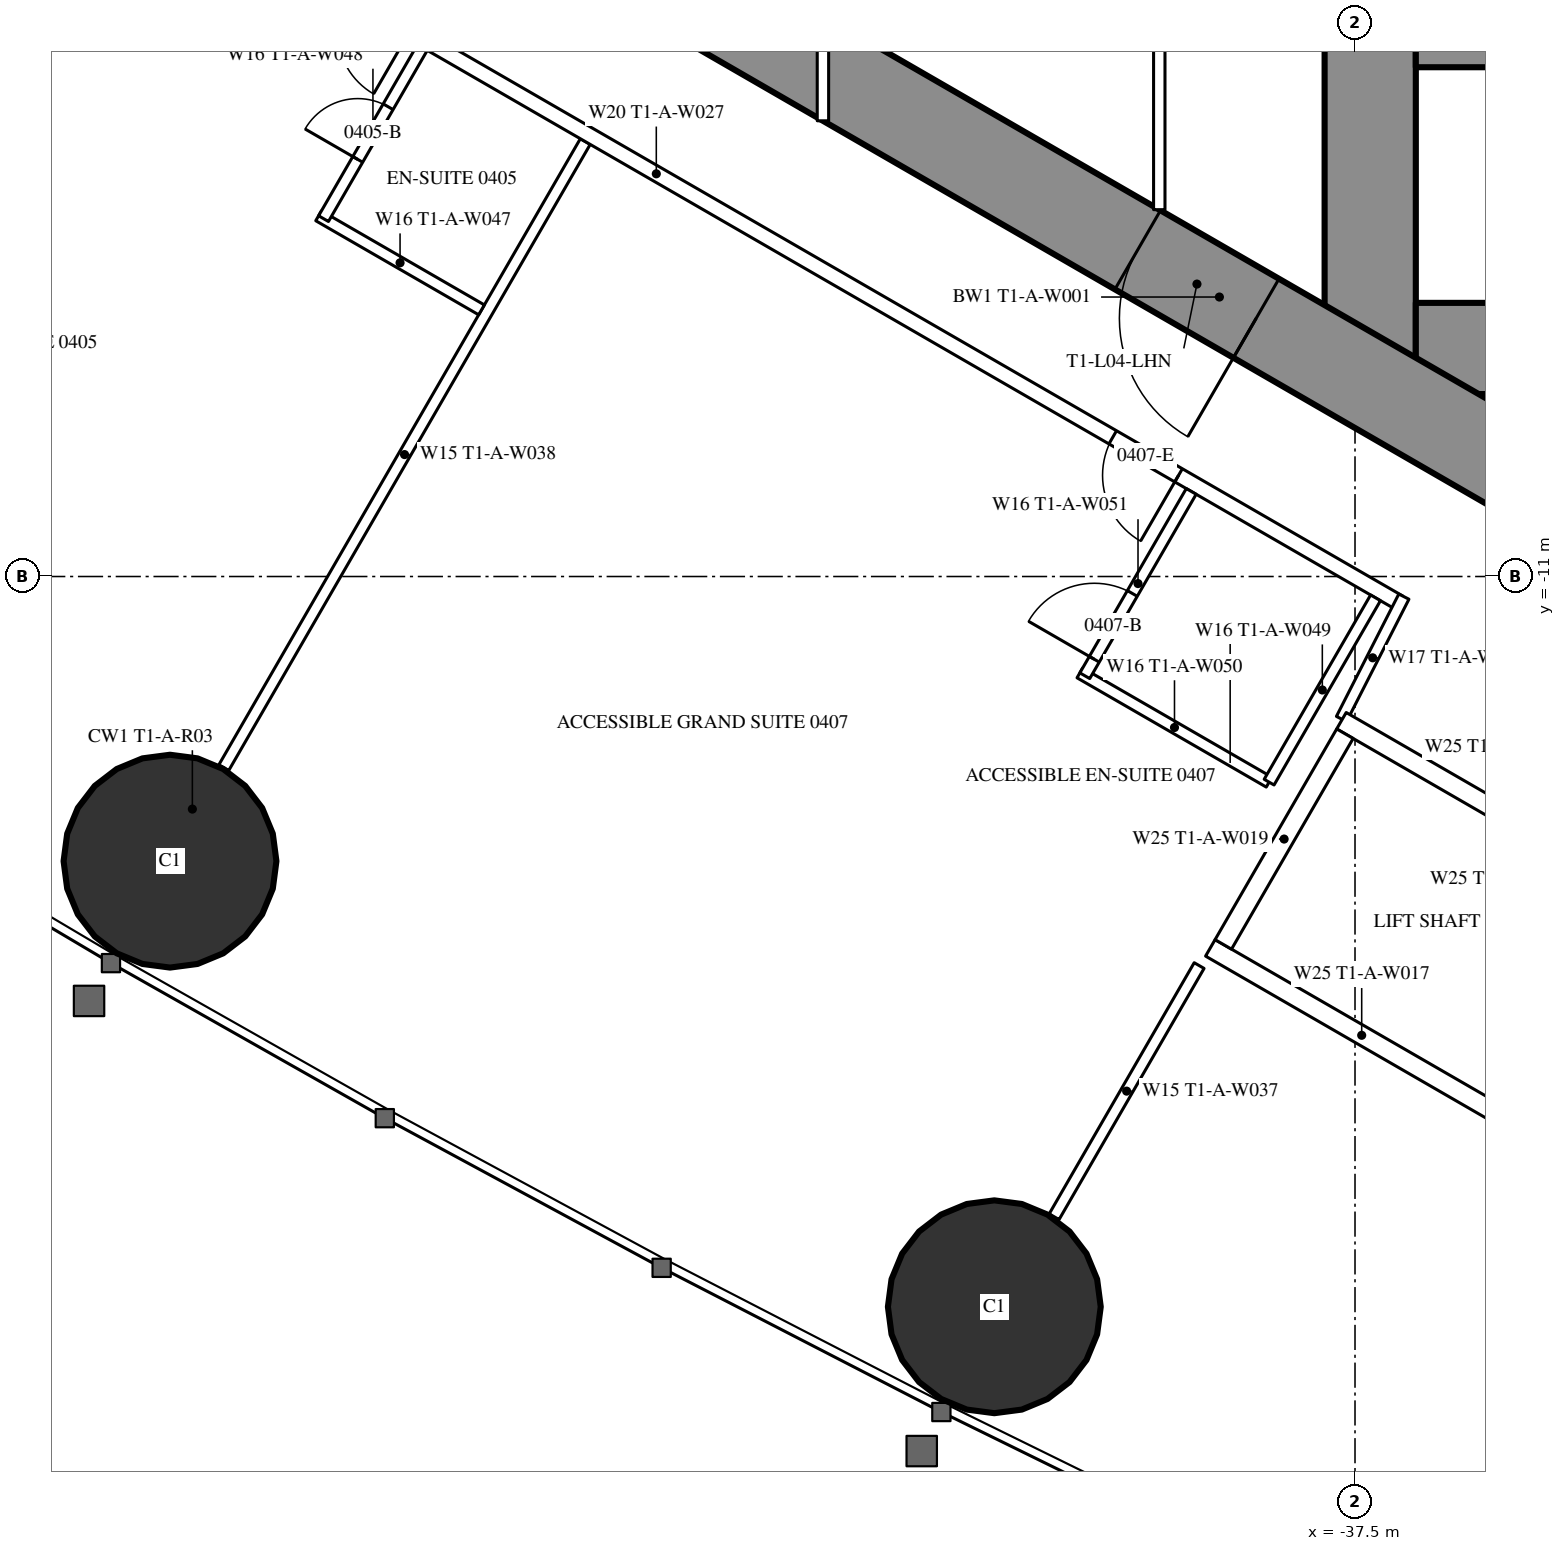
"""IFC4 building model, lengths in metres.
Left out: names, types, materials, properties, quantities, classifications, styles, units other than length and angle.
Written with IfcOpenShell. Run it as: python <this file> out.ifc"""

import sys

from ifc_helpers import new_model, si_unit, direction, frame, frame_2d, origin, origin_2d, place, context, subcontext, project, spatial, rectangle, hollow_circle, extrude, element, fill, save


model = new_model("IFC4")
c1 = context("Model", 3, precision=1e-05, world=origin(), true_north=direction((0.0, 1.0)))
c2 = subcontext(c1, "Body", "Model", "MODEL_VIEW")
j1 = project(units=[si_unit("LENGTHUNIT", "METRE"), si_unit("PLANEANGLEUNIT", "RADIAN")], contexts=[c1])
p1 = place(None, origin())
s1 = spatial("IfcSite", under=j1, at=p1, CompositionType="ELEMENT")
p2 = place(p1, origin())
s2 = spatial("IfcBuilding", under=s1, at=p2, CompositionType="ELEMENT")
p3 = place(p2, frame((0.0, 0.0, 21.5)))
s3 = spatial("IfcBuildingStorey", under=s2, at=p3, CompositionType="ELEMENT", Elevation=21.5)
for number, where, z_axis, x_axis in (
    (1, (-53.09, -14.745, 0.0), (0.0, 0.0, 1.0), (1.0, 0.0, 0.0)),
    (2, (-42.245, -20.607, 0.0), (0.0, 0.0, 1.0), (1.0, 0.0, 0.0)),
):
    element("IfcColumn", number, at=place(p3, frame(where, z_axis=z_axis, x_axis=x_axis)), inside=s3, PredefinedType="COLUMN", context=c2, shape_type="SweptSolid", body=[
        extrude(hollow_circle(Radius=1.4, WallThickness=0.12, at=origin_2d()), origin(), (0.0, 0.0, 1.0), 3.5),
    ])
p4 = place(p3, frame((-37.3, 8.6, 0.0), z_axis=(0.0, 0.0, 1.0), x_axis=(0.0, -1.0, 0.0)))
e3 = element("IfcWall", 3, at=p4, inside=s3, PredefinedType="SHEAR", context=c2, shape_type="SweptSolid", body=[
    extrude(rectangle(XDim=17.2, YDim=1.2, at=frame_2d((8.6, 0.0))), origin(), (0.0, 0.0, 1.0), 3.5),
])
p5 = place(p4, frame((7.7, 0.0, 0.0)))
e4 = element("IfcOpeningElement", 4, at=p5, cuts=e3, PredefinedType="OPENING", context=c2, shape_type="SweptSolid", body=[
    extrude(rectangle(XDim=1.8, YDim=2.2, at=frame_2d((0.9, 1.1))), frame((0.0, 0.61, 0.0), z_axis=(0.0, -1.0, 0.0), x_axis=(1.0, 0.0, 0.0)), (0.0, 0.0, 1.0), 1.22),
])
p6 = place(p3, frame((-28.3, -8.0, 0.0), z_axis=(0.0, 0.0, 1.0), x_axis=(-1.0, 0.0, 0.0)))
e5 = element("IfcWall", 5, at=p6, inside=s3, PredefinedType="SHEAR", context=c2, shape_type="SweptSolid", body=[
    extrude(rectangle(XDim=8.4, YDim=1.2, at=frame_2d((4.2, 0.0))), origin(), (0.0, 0.0, 1.0), 3.5),
])
p7 = place(p6, frame((0.25, 0.0, 0.0)))
e6 = element("IfcOpeningElement", 6, at=p7, cuts=e5, PredefinedType="OPENING", context=c2, shape_type="SweptSolid", body=[
    extrude(rectangle(XDim=1.0, YDim=2.2, at=frame_2d((0.5, 1.1))), frame((0.0, 0.61, 0.0), z_axis=(0.0, -1.0, 0.0), x_axis=(1.0, 0.0, 0.0)), (0.0, 0.0, 1.0), 1.22),
])
p8 = place(p3, frame((-28.3, -4.15, 0.0), z_axis=(0.0, 0.0, 1.0), x_axis=(-1.0, 0.0, 0.0)))
e7 = element("IfcWall", 7, at=p8, inside=s3, PredefinedType="SHEAR", context=c2, shape_type="SweptSolid", body=[
    extrude(rectangle(XDim=8.4, YDim=0.3, at=frame_2d((4.2, 0.0))), origin(), (0.0, 0.0, 1.0), 3.5),
])
p9 = place(p3, frame((-27.2, -14.3, 0.0), z_axis=(0.0, 0.0, 1.0), x_axis=(-0.866024021859, 0.500002393557, 0.0)))
e8 = element("IfcWall", 8, at=p9, inside=s3, PredefinedType="SHEAR", context=c2, shape_type="SweptSolid", body=[
    extrude(rectangle(XDim=27.907, YDim=1.2, at=frame_2d((13.954, 0.0))), origin(), (0.0, 0.0, 1.0), 3.5),
])
p10 = place(p9, frame((4.6, 0.0, 0.0)))
e9 = element("IfcOpeningElement", 9, at=p10, cuts=e8, PredefinedType="OPENING", context=c2, shape_type="SweptSolid", body=[
    extrude(rectangle(XDim=1.0, YDim=2.2, at=frame_2d((0.5, 1.1))), frame((0.0, 0.61, 0.0), z_axis=(0.0, -1.0, 0.0), x_axis=(1.0, 0.0, 0.0)), (0.0, 0.0, 1.0), 1.22),
])
p11 = place(p9, frame((13.395, 0.0, 0.0)))
e10 = element("IfcOpeningElement", 10, at=p11, cuts=e8, PredefinedType="OPENING", context=c2, shape_type="SweptSolid", body=[
    extrude(rectangle(XDim=1.8, YDim=2.2, at=frame_2d((0.9, 1.1))), frame((0.0, 0.61, 0.0), z_axis=(0.0, -1.0, 0.0), x_axis=(1.0, 0.0, 0.0)), (0.0, 0.0, 1.0), 1.22),
])
p12 = place(p3, frame((-47.627, -5.278, 0.0), z_axis=(0.0, 0.0, 1.0), x_axis=(-0.500009844318, -0.86601972009, 0.0)))
e11 = element("IfcWall", 11, at=p12, inside=s3, PredefinedType="PARTITIONING", context=c2, shape_type="SweptSolid", body=[
    extrude(rectangle(XDim=9.51, YDim=0.15, at=frame_2d((4.755, 0.0))), origin(), (0.0, 0.0, 1.0), 2.25),
])
p13 = place(p3, frame((-39.551, -16.118, 0.0), z_axis=(0.0, 0.0, 1.0), x_axis=(-0.499986503906, -0.866033195618, 0.0)))
e12 = element("IfcWall", 12, at=p13, inside=s3, PredefinedType="PARTITIONING", context=c2, shape_type="SweptSolid", body=[
    extrude(rectangle(XDim=3.815, YDim=0.15, at=frame_2d((1.907, 0.0))), origin(), (0.0, 0.0, 1.0), 3.25),
])
p14 = place(p3, frame((-36.92, -11.344, 0.0), z_axis=(0.0, 0.0, 1.0), x_axis=(-0.866028313256, 0.499994960614, 0.0)))
e13 = element("IfcWall", 13, at=p14, inside=s3, PredefinedType="PARTITIONING", context=c2, shape_type="SweptSolid", body=[
    extrude(rectangle(XDim=22.568, YDim=0.2, at=frame_2d((11.284, 0.0))), origin(), (0.0, 0.0, 1.0), 3.25),
])
p15 = place(p14, frame((15.03, 0.0, 0.0)))
e14 = element("IfcOpeningElement", 14, at=p15, cuts=e13, PredefinedType="OPENING", context=c2, shape_type="SweptSolid", body=[
    extrude(rectangle(XDim=0.95, YDim=2.2, at=frame_2d((0.475, 1.1))), frame((0.0, 0.11, 0.0), z_axis=(0.0, -1.0, 0.0), x_axis=(1.0, 0.0, 0.0)), (0.0, 0.0, 1.0), 0.22),
])
p16 = place(p14, frame((3.35, 0.0, 0.0)))
e15 = element("IfcOpeningElement", 15, at=p16, cuts=e13, PredefinedType="OPENING", context=c2, shape_type="SweptSolid", body=[
    extrude(rectangle(XDim=1.0, YDim=2.2, at=frame_2d((0.5, 1.1))), frame((0.0, 0.11, 0.0), z_axis=(0.0, -1.0, 0.0), x_axis=(1.0, 0.0, 0.0)), (0.0, 0.0, 1.0), 0.22),
])
p17 = place(p3, frame((-36.857, -11.265, 0.0), z_axis=(0.0, 0.0, 1.0), x_axis=(-0.454225294761, -0.890886851176, 0.0)))
e16 = element("IfcWall", 16, at=p17, inside=s3, PredefinedType="PARTITIONING", context=c2, shape_type="SweptSolid", body=[
    extrude(rectangle(XDim=1.807, YDim=0.15, at=frame_2d((0.904, 0.0))), origin(), (0.0, 0.0, 1.0), 3.25),
])
p18 = place(p3, frame((-48.992, -7.492, 0.0), z_axis=(0.0, 0.0, 1.0), x_axis=(-0.866031185235, 0.4999899861, 0.0)))
e17 = element("IfcWall", 17, at=p18, inside=s3, PredefinedType="PARTITIONING", context=c2, shape_type="SweptSolid", body=[
    extrude(rectangle(XDim=2.475, YDim=0.15, at=frame_2d((1.238, 0.0))), origin(), (0.0, 0.0, 1.0), 3.25),
])
p19 = place(p3, frame((-49.77, -4.04, 0.0), z_axis=(0.0, 0.0, 1.0), x_axis=(-0.500006934395, -0.866021400173, 0.0)))
e18 = element("IfcWall", 18, at=p19, inside=s3, PredefinedType="PARTITIONING", context=c2, shape_type="SweptSolid", body=[
    extrude(rectangle(XDim=2.6, YDim=0.15, at=frame_2d((1.3, 0.0))), origin(), (0.0, 0.0, 1.0), 3.25),
])
p20 = place(p19, frame((0.9, 0.0, 0.0)))
e19 = element("IfcOpeningElement", 19, at=p20, cuts=e18, PredefinedType="OPENING", context=c2, shape_type="SweptSolid", body=[
    extrude(rectangle(XDim=0.8, YDim=2.2, at=frame_2d((0.4, 1.1))), frame((0.0, 0.085, 0.0), z_axis=(0.0, -1.0, 0.0), x_axis=(1.0, 0.0, 0.0)), (0.0, 0.0, 1.0), 0.17),
])
p21 = place(p3, frame((-38.63, -13.705, 0.0), z_axis=(0.0, 0.0, 1.0), x_axis=(-0.866018712932, 0.500011588718, 0.0)))
e20 = element("IfcWall", 20, at=p21, inside=s3, PredefinedType="PARTITIONING", context=c2, shape_type="SweptSolid", body=[
    extrude(rectangle(XDim=2.875, YDim=0.15, at=frame_2d((1.438, 0.0))), origin(), (0.0, 0.0, 1.0), 3.25),
])
p22 = place(p3, frame((-39.655, -9.88, 0.0), z_axis=(0.0, 0.0, 1.0), x_axis=(-0.500049511043, -0.865996816683, 0.0)))
e21 = element("IfcWall", 21, at=p22, inside=s3, PredefinedType="PARTITIONING", context=c2, shape_type="SweptSolid", body=[
    extrude(rectangle(XDim=2.8, YDim=0.15, at=frame_2d((1.4, 0.0))), origin(), (0.0, 0.0, 1.0), 3.25),
])
p23 = place(p22, frame((1.55, 0.0, 0.0)))
e22 = element("IfcOpeningElement", 22, at=p23, cuts=e21, PredefinedType="OPENING", context=c2, shape_type="SweptSolid", body=[
    extrude(rectangle(XDim=1.0, YDim=2.2, at=frame_2d((0.5, 1.1))), frame((0.0, 0.085, 0.0), z_axis=(0.0, -1.0, 0.0), x_axis=(1.0, 0.0, 0.0)), (0.0, 0.0, 1.0), 0.17),
])
p24 = place(p3, frame((-37.23, -11.281, 0.0), z_axis=(0.0, 0.0, 1.0), x_axis=(-0.500049511043, -0.865996816683, 0.0)))
e23 = element("IfcWall", 23, at=p24, inside=s3, PredefinedType="PARTITIONING", context=c2, shape_type="SweptSolid", body=[
    extrude(rectangle(XDim=2.8, YDim=0.15, at=frame_2d((1.4, 0.0))), origin(), (0.0, 0.0, 1.0), 3.25),
])
p25 = place(p3, frame((-40.075, 1.2, 0.0), z_axis=(0.0, 0.0, 1.0), x_axis=(0.0, -1.0, 0.0)))
e24 = element("IfcWall", 24, at=p25, inside=s3, PredefinedType="PARTITIONING", context=c2, shape_type="SweptSolid", body=[
    extrude(rectangle(XDim=7.374, YDim=0.15, at=frame_2d((3.687, 0.0))), origin(), (0.0, 0.0, 1.0), 3.25),
])
p26 = place(p25, frame((2.787, 0.0, 0.0)))
e25 = element("IfcOpeningElement", 25, at=p26, cuts=e24, PredefinedType="OPENING", context=c2, shape_type="SweptSolid", body=[
    extrude(rectangle(XDim=1.8, YDim=2.2, at=frame_2d((0.9, 1.1))), frame((0.0, 0.085, 0.0), z_axis=(0.0, -1.0, 0.0), x_axis=(1.0, 0.0, 0.0)), (0.0, 0.0, 1.0), 0.17),
])
p27 = place(p3, frame((-44.5, 5.005, 0.0), z_axis=(0.0, 0.0, 1.0), x_axis=(0.0, -1.0, 0.0)))
e26 = element("IfcWall", 26, at=p27, inside=s3, PredefinedType="PARTITIONING", context=c2, shape_type="SweptSolid", body=[
    extrude(rectangle(XDim=10.009, YDim=0.15, at=frame_2d((5.005, 0.0))), origin(), (0.0, 0.0, 1.0), 2.45),
])
p28 = place(p27, frame((2.002, 0.0, 0.0)))
e27 = element("IfcOpeningElement", 27, at=p28, cuts=e26, PredefinedType="OPENING", context=c2, shape_type="SweptSolid", body=[
    extrude(rectangle(XDim=1.0, YDim=2.2, at=frame_2d((0.5, 1.1))), frame((0.0, 0.085, 0.0), z_axis=(0.0, -1.0, 0.0), x_axis=(1.0, 0.0, 0.0)), (0.0, 0.0, 1.0), 0.17),
])
p29 = place(p27, frame((7.007, 0.0, 0.0)))
e28 = element("IfcOpeningElement", 28, at=p29, cuts=e26, PredefinedType="OPENING", context=c2, shape_type="SweptSolid", body=[
    extrude(rectangle(XDim=1.0, YDim=2.2, at=frame_2d((0.5, 1.1))), frame((0.0, 0.085, 0.0), z_axis=(0.0, -1.0, 0.0), x_axis=(1.0, 0.0, 0.0)), (0.0, 0.0, 1.0), 0.17),
])
p30 = place(p3, frame((-33.696, -15.197, 0.0), z_axis=(0.0, 0.0, 1.0), x_axis=(-0.865976953817, 0.500083908417, 0.0)))
e29 = element("IfcWall", 29, at=p30, inside=s3, PredefinedType="PARTITIONING", context=c2, shape_type="SweptSolid", body=[
    extrude(rectangle(XDim=4.599, YDim=0.25, at=frame_2d((2.3, 0.0))), origin(), (0.0, 0.0, 1.0), 3.25),
])
p31 = place(p3, frame((-35.42, -18.186, 0.0), z_axis=(0.0, 0.0, 1.0), x_axis=(-0.865990227814, 0.50006092162, 0.0)))
e30 = element("IfcWall", 30, at=p31, inside=s3, PredefinedType="PARTITIONING", context=c2, shape_type="SweptSolid", body=[
    extrude(rectangle(XDim=4.6, YDim=0.25, at=frame_2d((2.3, 0.0))), origin(), (0.0, 0.0, 1.0), 3.25),
])
p32 = place(p3, frame((-37.633, -13.068, 0.0), z_axis=(0.0, 0.0, 1.0), x_axis=(-0.499872130319, -0.866099216793, 0.0)))
e31 = element("IfcWall", 31, at=p32, inside=s3, PredefinedType="PARTITIONING", context=c2, shape_type="SweptSolid", body=[
    extrude(rectangle(XDim=3.2, YDim=0.25, at=frame_2d((1.6, 0.0))), origin(), (0.0, 0.0, 1.0), 3.25),
])
p33 = place(p20, origin())
e32 = element("IfcDoor", 32, at=p33, inside=s3, OperationType="SINGLE_SWING_RIGHT", PredefinedType="DOOR", context=c2, shape_type="SweptSolid", body=[
    extrude(rectangle(XDim=0.8, YDim=2.2, at=frame_2d((0.4, 1.1))), frame((0.0, 0.025, 0.0), z_axis=(0.0, -1.0, 0.0), x_axis=(1.0, 0.0, 0.0)), (0.0, 0.0, 1.0), 0.05),
])
fill(e19, e32)
p34 = place(p23, origin())
e33 = element("IfcDoor", 33, at=p34, inside=s3, OperationType="SINGLE_SWING_RIGHT", PredefinedType="DOOR", context=c2, shape_type="SweptSolid", body=[
    extrude(rectangle(XDim=1.0, YDim=2.2, at=frame_2d((0.5, 1.1))), frame((0.0, 0.025, 0.0), z_axis=(0.0, -1.0, 0.0), x_axis=(1.0, 0.0, 0.0)), (0.0, 0.0, 1.0), 0.05),
])
fill(e22, e33)
p35 = place(p16, origin())
e34 = element("IfcDoor", 34, at=p35, inside=s3, OperationType="SINGLE_SWING_LEFT", PredefinedType="DOOR", context=c2, shape_type="SweptSolid", body=[
    extrude(rectangle(XDim=1.0, YDim=2.2, at=frame_2d((0.5, 1.1))), frame((0.0, 0.025, 0.0), z_axis=(0.0, -1.0, 0.0), x_axis=(1.0, 0.0, 0.0)), (0.0, 0.0, 1.0), 0.05),
])
fill(e15, e34)
p36 = place(p11, origin())
e35 = element("IfcDoor", 35, at=p36, inside=s3, OperationType="DOUBLE_DOOR_SINGLE_SWING", PredefinedType="DOOR", context=c2, shape_type="SweptSolid", body=[
    extrude(rectangle(XDim=1.8, YDim=2.2, at=frame_2d((0.9, 1.1))), frame((0.0, 0.025, 0.0), z_axis=(0.0, -1.0, 0.0), x_axis=(1.0, 0.0, 0.0)), (0.0, 0.0, 1.0), 0.05),
])
fill(e10, e35)
save(model, sys.argv[1])
